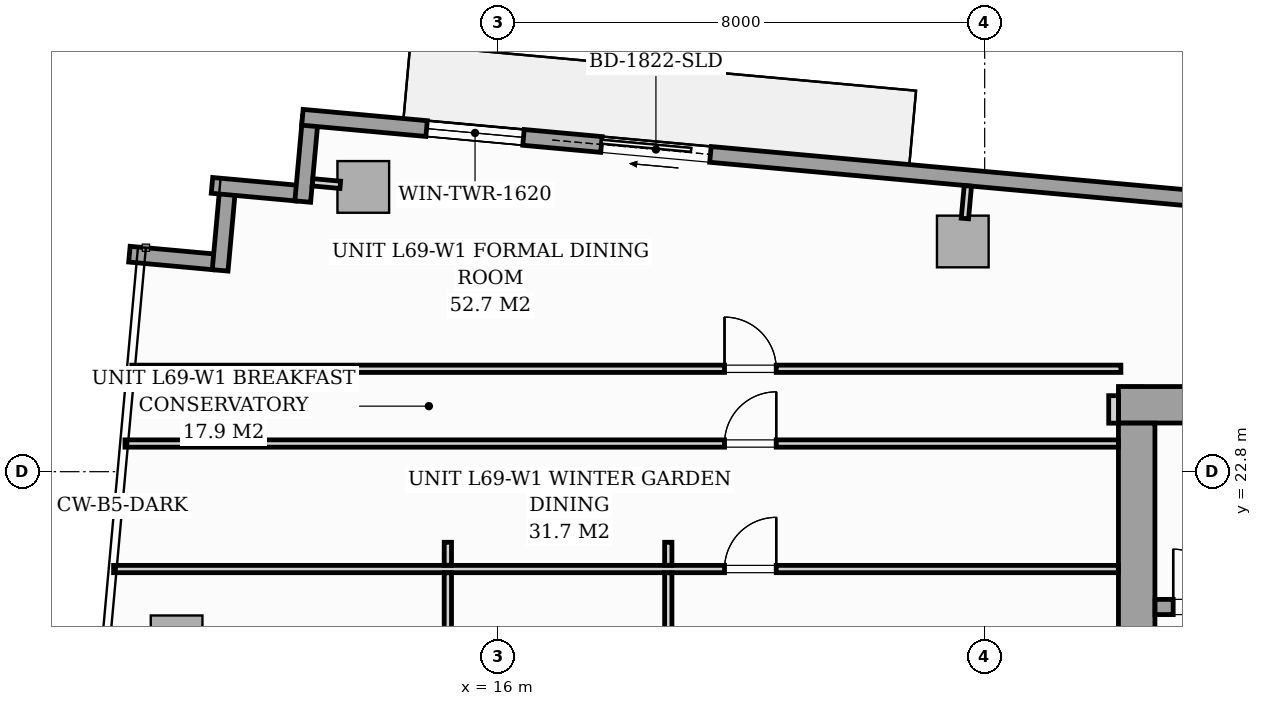
"""IFC4 building model, lengths in metres.
Left out: names, types, materials, properties, quantities, classifications, styles, units other than length and angle.
Written with IfcOpenShell. Run it as: python <this file> out.ifc"""

import sys

from ifc_helpers import new_model, si_unit, direction, frame, frame_2d, origin, origin_2d, place, context, subcontext, project, spatial, rectangle, i_section, extrude, source, transform, mapped, element, fill, save


model = new_model("IFC4")
c1 = context("Model", 3, precision=1e-05, world=origin(), true_north=direction((0.0, 1.0)))
c2 = subcontext(c1, "Body", "Model", "MODEL_VIEW")
j1 = project(units=[si_unit("LENGTHUNIT", "METRE"), si_unit("PLANEANGLEUNIT", "RADIAN")], contexts=[c1])
p1 = place(None, origin())
s1 = spatial("IfcSite", under=j1, at=p1, CompositionType="ELEMENT")
p2 = place(p1, origin())
s2 = spatial("IfcBuilding", under=s1, at=p2, CompositionType="ELEMENT")
p3 = place(p2, frame((0.0, 0.0, 239.7)))
s3 = spatial("IfcBuildingStorey", under=s2, at=p3, CompositionType="ELEMENT", Elevation=239.7)
m1 = source(origin(), c2, "Body", "SweptSolid", [
    extrude(i_section(OverallWidth=0.409, OverallDepth=0.425, WebThickness=0.033, FlangeThickness=0.052, FilletRadius=0.018, at=origin_2d()), origin(), (0.0, 0.0, 1.0), 3.296),
])
p4 = place(p3, frame((26.4, 24.0, 0.002), z_axis=(0.0, 0.0, 1.0), x_axis=(1.0, 0.0, 0.0)))
e1 = element("IfcColumn", 1, at=p4, inside=s3, PredefinedType="PILASTER", context=c2, shape_type="MappedRepresentation", body=[
    mapped(m1, transform((0.0, 0.0, 0.0), scale=1.0)),
])
m2 = source(origin(), c2, "Body", "SweptSolid", [
    extrude(rectangle(XDim=0.85, YDim=0.85, at=origin_2d()), origin(), (0.0, 0.0, 1.0), 3.296),
])
for number, where, z_axis, x_axis in (
    (2, (13.781, 27.483, 0.002), (0.0, 0.0, 1.0), (0.996, -0.091, 0.0)),
    (3, (23.64, 26.585, 0.002), (0.0, 0.0, 1.0), (0.996, -0.091, 0.0)),
    (4, (10.711, 20.01, 0.002), (0.0, 0.0, 1.0), (0.996, -0.091, 0.0)),
):
    element("IfcColumn", number, at=place(p3, frame(where, z_axis=z_axis, x_axis=x_axis)), inside=s3, PredefinedType="COLUMN", context=c2, shape_type="MappedRepresentation", body=[
        mapped(m2, transform((0.0, 0.0, 0.0), scale=1.0)),
    ])
for number, where, z_axis, x_axis in (
    (5, (9.935, 26.377, 0.0), (0.0, 0.0, 1.0), (0.996, -0.091, 0.0)),
    (6, (11.427, 26.111, 0.0), (0.0, 0.0, 1.0), (0.091, 0.996, 0.0)),
):
    element("IfcWall", number, at=place(p3, frame(where, z_axis=z_axis, x_axis=x_axis)), inside=s3, PredefinedType="STANDARD", context=c2, shape_type="SweptSolid", body=[
        extrude(rectangle(XDim=1.395, YDim=0.26, at=frame_2d((0.698, 0.0))), origin(), (0.0, 0.0, 1.0), 3.04),
    ])
p5 = place(p3, frame((11.293, 27.508, 0.0), z_axis=(0.0, 0.0, 1.0), x_axis=(0.995883159782, -0.090646191665, 0.0)))
e7 = element("IfcWall", 7, at=p5, inside=s3, PredefinedType="STANDARD", context=c2, shape_type="SweptSolid", body=[
    extrude(rectangle(XDim=1.395, YDim=0.26, at=frame_2d((0.698, 0.0))), origin(), (0.0, 0.0, 1.0), 3.04),
])
p6 = place(p3, frame((12.785, 27.242, 0.0), z_axis=(0.0, 0.0, 1.0), x_axis=(0.090472632758, 0.995898942023, 0.0)))
e8 = element("IfcWall", 8, at=p6, inside=s3, PredefinedType="STANDARD", context=c2, shape_type="SweptSolid", body=[
    extrude(rectangle(XDim=1.395, YDim=0.26, at=frame_2d((0.698, 0.0))), origin(), (0.0, 0.0, 1.0), 3.04),
])
p7 = place(p3, frame((12.781, 28.628, 0.0), z_axis=(0.0, 0.0, 1.0), x_axis=(0.995884584572, -0.090630536861, 0.0)))
e9 = element("IfcWall", 9, at=p7, inside=s3, PredefinedType="STANDARD", context=c2, shape_type="SweptSolid", body=[
    extrude(rectangle(XDim=14.63, YDim=0.26, at=frame_2d((7.315, 0.0))), origin(), (0.0, 0.0, 1.0), 3.04),
])
p8 = place(p7, frame((4.937, 0.0, 0.0)))
e10 = element("IfcOpeningElement", 10, at=p8, cuts=e9, PredefinedType="OPENING", context=c2, shape_type="SweptSolid", body=[
    extrude(rectangle(XDim=1.8, YDim=2.06, at=frame_2d((0.9, 1.03))), frame((0.0, 0.14, 0.0), z_axis=(0.0, -1.0, 0.0), x_axis=(1.0, 0.0, 0.0)), (0.0, 0.0, 1.0), 0.28),
])
p9 = place(p7, frame((2.05, 0.0, 0.65)))
e11 = element("IfcOpeningElement", 11, at=p9, cuts=e9, PredefinedType="OPENING", context=c2, shape_type="SweptSolid", body=[
    extrude(rectangle(XDim=1.6, YDim=1.5, at=frame_2d((0.8, 0.75))), frame((0.0, 0.14, 0.0), z_axis=(0.0, -1.0, 0.0), x_axis=(1.0, 0.0, 0.0)), (0.0, 0.0, 1.0), 0.28),
])
p10 = place(p3, frame((26.2, 23.9, 0.0), z_axis=(0.0, 0.0, 1.0), x_axis=(1.0, 0.0, 0.0)))
e12 = element("IfcWall", 12, at=p10, inside=s3, PredefinedType="SHEAR", context=c2, shape_type="SweptSolid", body=[
    extrude(rectangle(XDim=19.6, YDim=0.6, at=frame_2d((9.8, 0.0))), origin(), (0.0, 0.0, 1.0), 3.3),
])
p11 = place(p3, frame((26.5, 17.802, 0.0), z_axis=(0.0, 0.0, 1.0), x_axis=(0.0, 1.0, 0.0)))
e13 = element("IfcWall", 13, at=p11, inside=s3, PredefinedType="SHEAR", context=c2, shape_type="SweptSolid", body=[
    extrude(rectangle(XDim=5.796, YDim=0.6, at=frame_2d((2.898, 0.0))), origin(), (0.0, 0.0, 1.0), 3.3),
])
p12 = place(p3, frame((26.802, 20.575, 0.0), z_axis=(0.0, 0.0, 1.0), x_axis=(1.0, 0.0, 0.0)))
e14 = element("IfcWall", 14, at=p12, inside=s3, PredefinedType="SOLIDWALL", context=c2, shape_type="SweptSolid", body=[
    extrude(rectangle(XDim=8.148, YDim=0.25, at=frame_2d((4.074, 0.0))), origin(), (0.0, 0.0, 1.0), 3.3),
])
p13 = place(p12, frame((0.298, 0.0, 0.0)))
e15 = element("IfcOpeningElement", 15, at=p13, cuts=e14, PredefinedType="OPENING", context=c2, shape_type="SweptSolid", body=[
    extrude(rectangle(XDim=0.95, YDim=2.06, at=frame_2d((0.475, 1.03))), frame((0.0, 0.135, 0.0), z_axis=(0.0, -1.0, 0.0), x_axis=(1.0, 0.0, 0.0)), (0.0, 0.0, 1.0), 0.27),
])
p14 = place(p3, frame((26.12, 23.598, 0.0), z_axis=(0.0, 0.0, 1.0), x_axis=(0.0, 1.0, 0.0)))
e16 = element("IfcWall", 16, at=p14, inside=s3, PredefinedType="PARTITIONING", context=c2, shape_type="SweptSolid", body=[
    extrude(rectangle(XDim=0.452, YDim=0.16, at=frame_2d((0.226, 0.0))), origin(), (0.0, 0.0, 1.0), 3.04),
])
p15 = place(p3, frame((9.975, 24.492, 0.0), z_axis=(0.0, 0.0, 1.0), x_axis=(1.0, 0.0, 0.0)))
e17 = element("IfcWall", 17, at=p15, inside=s3, PredefinedType="PARTITIONING", context=c2, shape_type="SweptSolid", body=[
    extrude(rectangle(XDim=16.265, YDim=0.12, at=frame_2d((8.133, 0.0))), origin(), (0.0, 0.0, 1.0), 3.04),
])
p16 = place(p15, frame((9.748, 0.0, 0.0)))
e18 = element("IfcOpeningElement", 18, at=p16, cuts=e17, PredefinedType="OPENING", context=c2, shape_type="SweptSolid", body=[
    extrude(rectangle(XDim=0.85, YDim=2.05, at=frame_2d((0.425, 1.025))), frame((0.0, 0.07, 0.0), z_axis=(0.0, -1.0, 0.0), x_axis=(1.0, 0.0, 0.0)), (0.0, 0.0, 1.0), 0.14),
])
p17 = place(p3, frame((9.863, 23.263, 0.0), z_axis=(0.0, 0.0, 1.0), x_axis=(1.0, 0.0, 0.0)))
e19 = element("IfcWall", 19, at=p17, inside=s3, PredefinedType="PARTITIONING", context=c2, shape_type="SweptSolid", body=[
    extrude(rectangle(XDim=16.335, YDim=0.12, at=frame_2d((8.168, 0.0))), origin(), (0.0, 0.0, 1.0), 3.04),
])
p18 = place(p17, frame((9.859, 0.0, 0.0)))
e20 = element("IfcOpeningElement", 20, at=p18, cuts=e19, PredefinedType="OPENING", context=c2, shape_type="SweptSolid", body=[
    extrude(rectangle(XDim=0.85, YDim=2.05, at=frame_2d((0.425, 1.025))), frame((0.0, 0.07, 0.0), z_axis=(0.0, -1.0, 0.0), x_axis=(1.0, 0.0, 0.0)), (0.0, 0.0, 1.0), 0.14),
])
p19 = place(p3, frame((9.675, 21.199, 0.0), z_axis=(0.0, 0.0, 1.0), x_axis=(1.0, 0.0, 0.0)))
e21 = element("IfcWall", 21, at=p19, inside=s3, PredefinedType="PARTITIONING", context=c2, shape_type="SweptSolid", body=[
    extrude(rectangle(XDim=16.523, YDim=0.12, at=frame_2d((8.262, 0.0))), origin(), (0.0, 0.0, 1.0), 3.04),
])
p20 = place(p19, frame((10.047, 0.0, 0.0)))
e22 = element("IfcOpeningElement", 22, at=p20, cuts=e21, PredefinedType="OPENING", context=c2, shape_type="SweptSolid", body=[
    extrude(rectangle(XDim=0.85, YDim=2.05, at=frame_2d((0.425, 1.025))), frame((0.0, 0.07, 0.0), z_axis=(0.0, -1.0, 0.0), x_axis=(1.0, 0.0, 0.0)), (0.0, 0.0, 1.0), 0.14),
])
p21 = place(p3, frame((15.172, 11.902, 0.0), z_axis=(0.0, 0.0, 1.0), x_axis=(0.0, 1.0, 0.0)))
e23 = element("IfcWall", 23, at=p21, inside=s3, PredefinedType="PARTITIONING", context=c2, shape_type="SweptSolid", body=[
    extrude(rectangle(XDim=9.235, YDim=0.12, at=frame_2d((4.617, 0.0))), origin(), (0.0, 0.0, 1.0), 3.04),
])
p22 = place(p21, frame((4.193, 0.0, 0.0)))
e24 = element("IfcOpeningElement", 24, at=p22, cuts=e23, PredefinedType="OPENING", context=c2, shape_type="SweptSolid", body=[
    extrude(rectangle(XDim=0.85, YDim=2.05, at=frame_2d((0.425, 1.025))), frame((0.0, 0.07, 0.0), z_axis=(0.0, -1.0, 0.0), x_axis=(1.0, 0.0, 0.0)), (0.0, 0.0, 1.0), 0.14),
])
p23 = place(p3, frame((15.172, 21.261, 0.0), z_axis=(0.0, 0.0, 1.0), x_axis=(0.0, 1.0, 0.0)))
e25 = element("IfcWall", 25, at=p23, inside=s3, PredefinedType="PARTITIONING", context=c2, shape_type="SweptSolid", body=[
    extrude(rectangle(XDim=0.378, YDim=0.12, at=frame_2d((0.189, 0.0))), origin(), (0.0, 0.0, 1.0), 3.04),
])
p24 = place(p3, frame((18.797, 11.902, 0.0), z_axis=(0.0, 0.0, 1.0), x_axis=(0.0, 1.0, 0.0)))
e26 = element("IfcWall", 26, at=p24, inside=s3, PredefinedType="PARTITIONING", context=c2, shape_type="SweptSolid", body=[
    extrude(rectangle(XDim=9.235, YDim=0.12, at=frame_2d((4.617, 0.0))), origin(), (0.0, 0.0, 1.0), 3.04),
])
p25 = place(p24, frame((4.193, 0.0, 0.0)))
e27 = element("IfcOpeningElement", 27, at=p25, cuts=e26, PredefinedType="OPENING", context=c2, shape_type="SweptSolid", body=[
    extrude(rectangle(XDim=0.85, YDim=2.05, at=frame_2d((0.425, 1.025))), frame((0.0, 0.07, 0.0), z_axis=(0.0, -1.0, 0.0), x_axis=(1.0, 0.0, 0.0)), (0.0, 0.0, 1.0), 0.14),
])
p26 = place(p3, frame((18.797, 21.261, 0.0), z_axis=(0.0, 0.0, 1.0), x_axis=(0.0, 1.0, 0.0)))
e28 = element("IfcWall", 28, at=p26, inside=s3, PredefinedType="PARTITIONING", context=c2, shape_type="SweptSolid", body=[
    extrude(rectangle(XDim=0.378, YDim=0.12, at=frame_2d((0.189, 0.0))), origin(), (0.0, 0.0, 1.0), 3.04),
])
p27 = place(p3, frame((13.403, 27.517, 0.0), z_axis=(0.0, 0.0, 1.0), x_axis=(-0.995884462012, 0.090631883588, 0.0)))
e29 = element("IfcWall", 29, at=p27, inside=s3, PredefinedType="PARTITIONING", context=c2, shape_type="SweptSolid", body=[
    extrude(rectangle(XDim=0.458, YDim=0.12, at=frame_2d((0.229, 0.0))), origin(), (0.0, 0.0, 1.0), 3.04),
])
p28 = place(p3, frame((23.675, 26.964, 0.0), z_axis=(0.0, 0.0, 1.0), x_axis=(0.090740281653, 0.995874591144, 0.0)))
e30 = element("IfcWall", 30, at=p28, inside=s3, PredefinedType="PARTITIONING", context=c2, shape_type="SweptSolid", body=[
    extrude(rectangle(XDim=0.538, YDim=0.12, at=frame_2d((0.269, 0.0))), origin(), (0.0, 0.0, 1.0), 3.04),
])
m3 = source(origin(), c2, "Body", "SweptSolid", [
    extrude(rectangle(XDim=1.8, YDim=2.06, at=frame_2d((0.9, 1.03))), frame((0.0, 0.025, 0.0), z_axis=(0.0, -1.0, 0.0), x_axis=(1.0, 0.0, 0.0)), (0.0, 0.0, 1.0), 0.05),
])
p29 = place(p8, origin())
e31 = element("IfcDoor", 31, at=p29, inside=s3, OperationType="SLIDING_TO_LEFT", PredefinedType="DOOR", context=c2, shape_type="MappedRepresentation", body=[
    mapped(m3, transform((0.0, 0.0, 0.0), scale=1.0)),
])
fill(e10, e31)
m4 = source(origin(), c2, "Body", "SweptSolid", [
    extrude(rectangle(XDim=1.6, YDim=1.5, at=frame_2d((0.8, 0.75))), frame((0.0, 0.03, 0.0), z_axis=(0.0, -1.0, 0.0), x_axis=(1.0, 0.0, 0.0)), (0.0, 0.0, 1.0), 0.06),
])
p30 = place(p9, origin())
e32 = element("IfcWindow", 32, at=p30, inside=s3, PartitioningType="SINGLE_PANEL", PredefinedType="WINDOW", context=c2, shape_type="MappedRepresentation", body=[
    mapped(m4, transform((0.0, 0.0, 0.0), scale=1.0)),
])
fill(e11, e32)
m5 = source(origin(), c2, "Body", "SweptSolid", [
    extrude(rectangle(XDim=0.95, YDim=2.06, at=frame_2d((0.475, 1.03))), frame((0.0, 0.025, 0.0), z_axis=(0.0, -1.0, 0.0), x_axis=(1.0, 0.0, 0.0)), (0.0, 0.0, 1.0), 0.05),
])
p31 = place(p13, origin())
e33 = element("IfcDoor", 33, at=p31, inside=s3, OperationType="SINGLE_SWING_LEFT", PredefinedType="DOOR", context=c2, shape_type="MappedRepresentation", body=[
    mapped(m5, transform((0.0, 0.0, 0.0), scale=1.0)),
])
fill(e15, e33)
m6 = source(origin(), c2, "Body", "SweptSolid", [
    extrude(rectangle(XDim=0.85, YDim=2.05, at=frame_2d((0.425, 1.025))), frame((0.0, 0.025, 0.0), z_axis=(0.0, -1.0, 0.0), x_axis=(1.0, 0.0, 0.0)), (0.0, 0.0, 1.0), 0.05),
])
p32 = place(p16, origin())
e34 = element("IfcDoor", 34, at=p32, inside=s3, OperationType="SINGLE_SWING_LEFT", PredefinedType="DOOR", context=c2, shape_type="MappedRepresentation", body=[
    mapped(m6, transform((0.0, 0.0, 0.0), scale=1.0)),
])
fill(e18, e34)
p33 = place(p18, origin())
e35 = element("IfcDoor", 35, at=p33, inside=s3, OperationType="SINGLE_SWING_RIGHT", PredefinedType="DOOR", context=c2, shape_type="MappedRepresentation", body=[
    mapped(m6, transform((0.0, 0.0, 0.0), scale=1.0)),
])
fill(e20, e35)
p34 = place(p20, origin())
e36 = element("IfcDoor", 36, at=p34, inside=s3, OperationType="SINGLE_SWING_RIGHT", PredefinedType="DOOR", context=c2, shape_type="MappedRepresentation", body=[
    mapped(m6, transform((0.0, 0.0, 0.0), scale=1.0)),
])
fill(e22, e36)
save(model, sys.argv[1])
